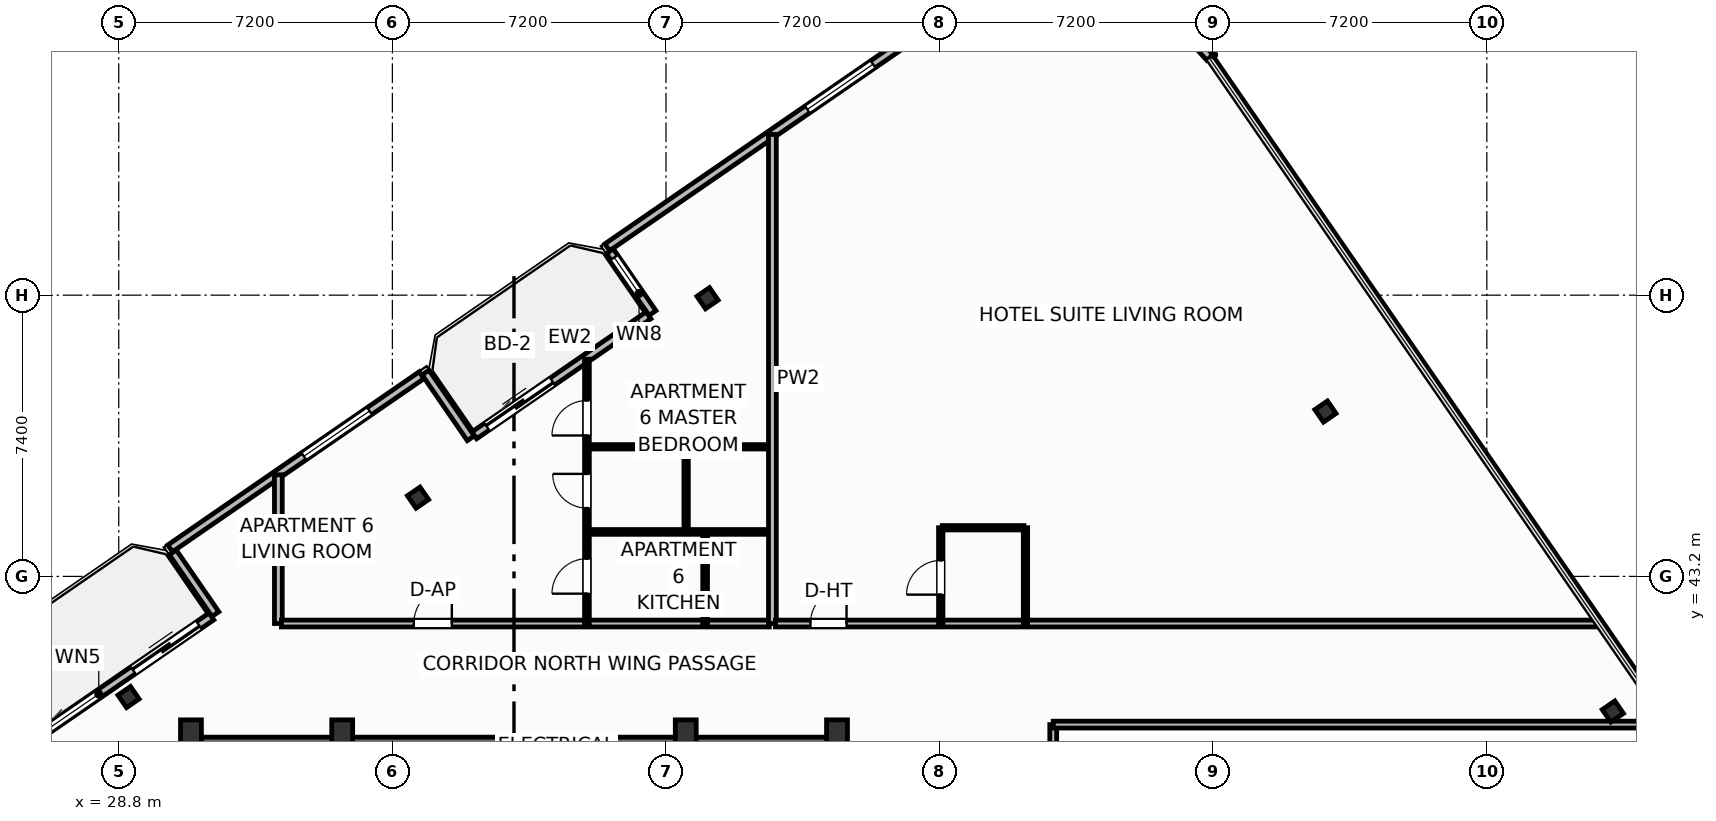
"""IFC4 building model, lengths in metres.
Left out: names, types, materials, properties, quantities, classifications, styles, units other than length and angle.
Written with IfcOpenShell. Run it as: python <this file> out.ifc"""

import sys

from ifc_helpers import new_model, si_unit, direction, frame, frame_2d, origin, origin_2d, place, context, subcontext, project, spatial, rectangle, i_section, extrude, element, fill, save


model = new_model("IFC4")
c1 = context("Model", 3, precision=1e-05, world=origin(), true_north=direction((0.0, 1.0)))
c2 = subcontext(c1, "Body", "Model", "MODEL_VIEW")
j1 = project(units=[si_unit("LENGTHUNIT", "METRE"), si_unit("PLANEANGLEUNIT", "RADIAN")], contexts=[c1])
p1 = place(None, origin())
s1 = spatial("IfcSite", under=j1, at=p1, CompositionType="ELEMENT")
p2 = place(p1, origin())
s2 = spatial("IfcBuilding", under=s1, at=p2, CompositionType="ELEMENT")
p3 = place(p2, frame((0.0, 0.0, 273.0)))
s3 = spatial("IfcBuildingStorey", under=s2, at=p3, CompositionType="ELEMENT", Elevation=273.0)
for number, where, z_axis, x_axis in (
    (1, (30.7, 39.05, 0.0), (0.0, 0.0, 1.0), (1.0, 0.0, 0.0)),
    (2, (34.68, 39.05, 0.0), (0.0, 0.0, 1.0), (1.0, 0.0, 0.0)),
    (3, (43.72, 39.05, 0.0), (0.0, 0.0, 1.0), (1.0, 0.0, 0.0)),
    (4, (47.7, 39.05, 0.0), (0.0, 0.0, 1.0), (1.0, 0.0, 0.0)),
):
    element("IfcColumn", number, at=place(p3, frame(where, z_axis=z_axis, x_axis=x_axis)), inside=s3, PredefinedType="COLUMN", context=c2, shape_type="SweptSolid", body=[
        extrude(rectangle(XDim=0.55, YDim=0.75, at=origin_2d()), origin(), (0.0, 0.0, 1.0), 3.7),
    ])
p4 = place(p3, frame((30.58, 38.695, 0.0), z_axis=(0.0, 0.0, 1.0), x_axis=(1.0, 0.0, 0.0)))
e5 = element("IfcWall", 5, at=p4, inside=s3, PredefinedType="SHEAR", context=c2, shape_type="SweptSolid", body=[
    extrude(rectangle(XDim=17.24, YDim=0.55, at=frame_2d((8.62, 0.0))), origin(), (0.0, 0.0, 1.0), 3.45),
])
for number, where, z_axis, x_axis in (
    (6, (68.115, 39.644, 0.0), (0.0, 0.0, 1.0), (0.824, 0.567, 0.0)),
    (7, (60.554, 47.537, 0.0), (0.0, 0.0, 1.0), (0.824, 0.567, 0.0)),
    (8, (44.292, 50.519, 0.0), (0.0, 0.0, 1.0), (0.824, 0.567, 0.0)),
    (9, (36.675, 45.272, 0.0), (0.0, 0.0, 1.0), (0.824, 0.567, 0.0)),
    (10, (29.057, 40.025, 0.0), (0.0, 0.0, 1.0), (0.824, 0.567, 0.0)),
):
    element("IfcColumn", number, at=place(p3, frame(where, z_axis=z_axis, x_axis=x_axis)), inside=s3, PredefinedType="COLUMN", context=c2, shape_type="SweptSolid", body=[
        extrude(i_section(OverallWidth=0.401, OverallDepth=0.399, WebThickness=0.025, FlangeThickness=0.04, FilletRadius=0.022, at=origin_2d()), origin(), (0.0, 0.0, 1.0), 3.7),
    ])
p5 = place(p3, frame((26.297, 38.743, 0.0), z_axis=(0.0, 0.0, 1.0), x_axis=(0.823534636215, 0.567265989598, 0.0)))
e11 = element("IfcWall", 11, at=p5, inside=s3, PredefinedType="SOLIDWALL", context=c2, shape_type="SweptSolid", body=[
    extrude(rectangle(XDim=6.0, YDim=0.22, at=frame_2d((3.0, 0.0))), origin(), (0.0, 0.0, 1.0), 2.73),
])
p6 = place(p5, frame((3.5, 0.0, 0.0)))
e12 = element("IfcOpeningElement", 12, at=p6, cuts=e11, PredefinedType="OPENING", context=c2, shape_type="SweptSolid", body=[
    extrude(rectangle(XDim=2.1, YDim=2.3, at=frame_2d((1.05, 1.15))), frame((0.0, 0.12, 0.0), z_axis=(0.0, -1.0, 0.0), x_axis=(1.0, 0.0, 0.0)), (0.0, 0.0, 1.0), 0.24),
])
p7 = place(p5, frame((0.55, 0.0, 0.75)))
e13 = element("IfcOpeningElement", 13, at=p7, cuts=e11, PredefinedType="OPENING", context=c2, shape_type="SweptSolid", body=[
    extrude(rectangle(XDim=1.85, YDim=1.75, at=frame_2d((0.925, 0.875))), frame((0.0, 0.12, 0.0), z_axis=(0.0, -1.0, 0.0), x_axis=(1.0, 0.0, 0.0)), (0.0, 0.0, 1.0), 0.24),
])
p8 = place(p3, frame((38.156, 46.912, 0.0), z_axis=(0.0, 0.0, 1.0), x_axis=(0.823527178548, 0.567276816195, 0.0)))
e14 = element("IfcWall", 14, at=p8, inside=s3, PredefinedType="SOLIDWALL", context=c2, shape_type="SweptSolid", body=[
    extrude(rectangle(XDim=5.567, YDim=0.22, at=frame_2d((2.783, 0.0))), origin(), (0.0, 0.0, 1.0), 2.73),
])
p9 = place(p8, frame((0.4, 0.0, 0.0)))
e15 = element("IfcOpeningElement", 15, at=p9, cuts=e14, PredefinedType="OPENING", context=c2, shape_type="SweptSolid", body=[
    extrude(rectangle(XDim=2.1, YDim=2.3, at=frame_2d((1.05, 1.15))), frame((0.0, 0.12, 0.0), z_axis=(0.0, -1.0, 0.0), x_axis=(1.0, 0.0, 0.0)), (0.0, 0.0, 1.0), 0.24),
])
p10 = place(p3, frame((57.51, 56.855, 0.0), z_axis=(0.0, 0.0, 1.0), x_axis=(-0.669853727156, 0.742493086982, 0.0)))
e16 = element("IfcWall", 16, at=p10, inside=s3, PredefinedType="SOLIDWALL", context=c2, shape_type="SweptSolid", body=[
    extrude(rectangle(XDim=1.274, YDim=0.22, at=frame_2d((0.637, 0.0))), origin(), (0.0, 0.0, 1.0), 2.73),
])
p11 = place(p3, frame((50.697, 58.087, 0.0), z_axis=(0.0, 0.0, 1.0), x_axis=(-0.823539455464, -0.567258993137, 0.0)))
e17 = element("IfcWall", 17, at=p11, inside=s3, PredefinedType="SOLIDWALL", context=c2, shape_type="SweptSolid", body=[
    extrude(rectangle(XDim=10.98, YDim=0.22, at=frame_2d((5.49, 0.0))), origin(), (0.0, 0.0, 1.0), 2.73),
])
p12 = place(p11, frame((2.486, 0.0, 0.8)))
e18 = element("IfcOpeningElement", 18, at=p12, cuts=e17, PredefinedType="OPENING", context=c2, shape_type="SweptSolid", body=[
    extrude(rectangle(XDim=2.1, YDim=1.75, at=frame_2d((1.05, 0.875))), frame((0.0, 0.12, 0.0), z_axis=(0.0, -1.0, 0.0), x_axis=(1.0, 0.0, 0.0)), (0.0, 0.0, 1.0), 0.24),
])
p13 = place(p3, frame((41.725, 51.756, 0.0), z_axis=(0.0, 0.0, 1.0), x_axis=(0.567273565974, -0.823529417415, 0.0)))
e19 = element("IfcWall", 19, at=p13, inside=s3, PredefinedType="SOLIDWALL", context=c2, shape_type="SweptSolid", body=[
    extrude(rectangle(XDim=1.975, YDim=0.22, at=frame_2d((0.988, 0.0))), origin(), (0.0, 0.0, 1.0), 2.73),
])
p14 = place(p13, frame((0.2, 0.0, 0.8)))
e20 = element("IfcOpeningElement", 20, at=p14, cuts=e19, PredefinedType="OPENING", context=c2, shape_type="SweptSolid", body=[
    extrude(rectangle(XDim=1.15, YDim=1.4, at=frame_2d((0.575, 0.7))), frame((0.0, 0.12, 0.0), z_axis=(0.0, -1.0, 0.0), x_axis=(1.0, 0.0, 0.0)), (0.0, 0.0, 1.0), 0.24),
])
p15 = place(p3, frame((38.063, 46.835, 0.0), z_axis=(0.0, 0.0, 1.0), x_axis=(-0.567219383419, 0.823566737474, 0.0)))
e21 = element("IfcWall", 21, at=p15, inside=s3, PredefinedType="SOLIDWALL", context=c2, shape_type="SweptSolid", body=[
    extrude(rectangle(XDim=2.1, YDim=0.22, at=frame_2d((1.05, 0.0))), origin(), (0.0, 0.0, 1.0), 2.73),
])
p16 = place(p3, frame((36.769, 48.494, 0.0), z_axis=(0.0, 0.0, 1.0), x_axis=(-0.823521165086, -0.56728554596, 0.0)))
e22 = element("IfcWall", 22, at=p16, inside=s3, PredefinedType="SOLIDWALL", context=c2, shape_type="SweptSolid", body=[
    extrude(rectangle(XDim=8.035, YDim=0.22, at=frame_2d((4.018, 0.0))), origin(), (0.0, 0.0, 1.0), 2.73),
])
p17 = place(p16, frame((1.662, 0.0, 0.8)))
e23 = element("IfcOpeningElement", 23, at=p17, cuts=e22, PredefinedType="OPENING", context=c2, shape_type="SweptSolid", body=[
    extrude(rectangle(XDim=2.1, YDim=1.75, at=frame_2d((1.05, 0.875))), frame((0.0, 0.12, 0.0), z_axis=(0.0, -1.0, 0.0), x_axis=(1.0, 0.0, 0.0)), (0.0, 0.0, 1.0), 0.24),
])
p18 = place(p3, frame((30.223, 43.833, 0.0), z_axis=(0.0, 0.0, 1.0), x_axis=(0.567215821234, -0.823569190865, 0.0)))
e24 = element("IfcWall", 24, at=p18, inside=s3, PredefinedType="SOLIDWALL", context=c2, shape_type="SweptSolid", body=[
    extrude(rectangle(XDim=1.975, YDim=0.22, at=frame_2d((0.988, 0.0))), origin(), (0.0, 0.0, 1.0), 2.73),
])
p19 = place(p3, frame((33.0, 41.96, 0.0), z_axis=(0.0, 0.0, 1.0), x_axis=(0.0, 1.0, 0.0)))
e25 = element("IfcWall", 25, at=p19, inside=s3, PredefinedType="PARTITIONING", context=c2, shape_type="SweptSolid", body=[
    extrude(rectangle(XDim=3.914, YDim=0.205, at=frame_2d((1.957, 0.0))), origin(), (0.0, 0.0, 1.0), 3.45),
])
p20 = place(p3, frame((33.08, 41.96, 0.0), z_axis=(0.0, 0.0, 1.0), x_axis=(1.0, 0.0, 0.0)))
e26 = element("IfcWall", 26, at=p20, inside=s3, PredefinedType="PARTITIONING", context=c2, shape_type="SweptSolid", body=[
    extrude(rectangle(XDim=12.84, YDim=0.18, at=frame_2d((6.42, 0.0))), origin(), (0.0, 0.0, 1.0), 3.45),
])
p21 = place(p20, frame((3.485, 0.0, 0.0)))
e27 = element("IfcOpeningElement", 27, at=p21, cuts=e26, PredefinedType="OPENING", context=c2, shape_type="SweptSolid", body=[
    extrude(rectangle(XDim=1.0, YDim=2.2, at=frame_2d((0.5, 1.1))), frame((0.0, 0.1, 0.0), z_axis=(0.0, -1.0, 0.0), x_axis=(1.0, 0.0, 0.0)), (0.0, 0.0, 1.0), 0.2),
])
p22 = place(p3, frame((41.12, 41.96, 0.0), z_axis=(0.0, 0.0, 1.0), x_axis=(0.0, 1.0, 0.0)))
e28 = element("IfcWall", 28, at=p22, inside=s3, PredefinedType="PARTITIONING", context=c2, shape_type="SweptSolid", body=[
    extrude(rectangle(XDim=6.957, YDim=0.125, at=frame_2d((3.479, 0.0))), origin(), (0.0, 0.0, 1.0), 3.45),
])
p23 = place(p22, frame((0.785, 0.0, 0.0)))
e29 = element("IfcOpeningElement", 29, at=p23, cuts=e28, PredefinedType="OPENING", context=c2, shape_type="SweptSolid", body=[
    extrude(rectangle(XDim=0.92, YDim=2.05, at=frame_2d((0.46, 1.025))), frame((0.0, 0.073, 0.0), z_axis=(0.0, -1.0, 0.0), x_axis=(1.0, 0.0, 0.0)), (0.0, 0.0, 1.0), 0.145),
])
p24 = place(p22, frame((3.037, 0.0, 0.0)))
e30 = element("IfcOpeningElement", 30, at=p24, cuts=e28, PredefinedType="OPENING", context=c2, shape_type="SweptSolid", body=[
    extrude(rectangle(XDim=0.9, YDim=2.05, at=frame_2d((0.45, 1.025))), frame((0.0, 0.073, 0.0), z_axis=(0.0, -1.0, 0.0), x_axis=(1.0, 0.0, 0.0)), (0.0, 0.0, 1.0), 0.145),
])
p25 = place(p22, frame((4.948, 0.0, 0.0)))
e31 = element("IfcOpeningElement", 31, at=p25, cuts=e28, PredefinedType="OPENING", context=c2, shape_type="SweptSolid", body=[
    extrude(rectangle(XDim=0.92, YDim=2.05, at=frame_2d((0.46, 1.025))), frame((0.0, 0.073, 0.0), z_axis=(0.0, -1.0, 0.0), x_axis=(1.0, 0.0, 0.0)), (0.0, 0.0, 1.0), 0.145),
])
p26 = place(p3, frame((41.19, 44.37, 0.0), z_axis=(0.0, 0.0, 1.0), x_axis=(1.0, 0.0, 0.0)))
e32 = element("IfcWall", 32, at=p26, inside=s3, PredefinedType="PARTITIONING", context=c2, shape_type="SweptSolid", body=[
    extrude(rectangle(XDim=4.73, YDim=0.125, at=frame_2d((2.365, 0.0))), origin(), (0.0, 0.0, 1.0), 3.45),
])
p27 = place(p3, frame((41.19, 46.61, 0.0), z_axis=(0.0, 0.0, 1.0), x_axis=(1.0, 0.0, 0.0)))
e33 = element("IfcWall", 33, at=p27, inside=s3, PredefinedType="PARTITIONING", context=c2, shape_type="SweptSolid", body=[
    extrude(rectangle(XDim=4.73, YDim=0.115, at=frame_2d((2.365, 0.0))), origin(), (0.0, 0.0, 1.0), 3.45),
])
p28 = place(p3, frame((44.23, 41.96, 0.0), z_axis=(0.0, 0.0, 1.0), x_axis=(0.0, 1.0, 0.0)))
e34 = element("IfcWall", 34, at=p28, inside=s3, PredefinedType="PARTITIONING", context=c2, shape_type="SweptSolid", body=[
    extrude(rectangle(XDim=2.41, YDim=0.125, at=frame_2d((1.205, 0.0))), origin(), (0.0, 0.0, 1.0), 3.45),
])
p29 = place(p3, frame((43.73, 44.37, 0.0), z_axis=(0.0, 0.0, 1.0), x_axis=(0.0, 1.0, 0.0)))
e35 = element("IfcWall", 35, at=p29, inside=s3, PredefinedType="PARTITIONING", context=c2, shape_type="SweptSolid", body=[
    extrude(rectangle(XDim=2.24, YDim=0.115, at=frame_2d((1.12, 0.0))), origin(), (0.0, 0.0, 1.0), 3.45),
])
p30 = place(p3, frame((46.0, 41.96, 0.0), z_axis=(0.0, 0.0, 1.0), x_axis=(0.0, 1.0, 0.0)))
e36 = element("IfcWall", 36, at=p30, inside=s3, PredefinedType="PARTITIONING", context=c2, shape_type="SweptSolid", body=[
    extrude(rectangle(XDim=12.868, YDim=0.205, at=frame_2d((6.434, 0.0))), origin(), (0.0, 0.0, 1.0), 3.45),
])
p31 = place(p3, frame((46.08, 41.96, 0.0), z_axis=(0.0, 0.0, 1.0), x_axis=(1.0, 0.0, 0.0)))
e37 = element("IfcWall", 37, at=p31, inside=s3, PredefinedType="PARTITIONING", context=c2, shape_type="SweptSolid", body=[
    extrude(rectangle(XDim=21.627, YDim=0.18, at=frame_2d((10.813, 0.0))), origin(), (0.0, 0.0, 1.0), 3.45),
])
p32 = place(p31, frame((0.921, 0.0, 0.0)))
e38 = element("IfcOpeningElement", 38, at=p32, cuts=e37, PredefinedType="OPENING", context=c2, shape_type="SweptSolid", body=[
    extrude(rectangle(XDim=0.95, YDim=2.15, at=frame_2d((0.475, 1.075))), frame((0.0, 0.1, 0.0), z_axis=(0.0, -1.0, 0.0), x_axis=(1.0, 0.0, 0.0)), (0.0, 0.0, 1.0), 0.2),
])
p33 = place(p3, frame((50.47, 44.48, 0.0), z_axis=(0.0, 0.0, 1.0), x_axis=(1.0, 0.0, 0.0)))
e39 = element("IfcWall", 39, at=p33, inside=s3, PredefinedType="PARTITIONING", context=c2, shape_type="SweptSolid", body=[
    extrude(rectangle(XDim=2.15, YDim=0.115, at=frame_2d((1.075, 0.0))), origin(), (0.0, 0.0, 1.0), 3.018),
])
p34 = place(p3, frame((50.43, 41.96, 0.0), z_axis=(0.0, 0.0, 1.0), x_axis=(0.0, 1.0, 0.0)))
e40 = element("IfcWall", 40, at=p34, inside=s3, PredefinedType="PARTITIONING", context=c2, shape_type="SweptSolid", body=[
    extrude(rectangle(XDim=2.52, YDim=0.115, at=frame_2d((1.26, 0.0))), origin(), (0.0, 0.0, 1.0), 3.45),
])
p35 = place(p34, frame((0.76, 0.0, 0.0)))
e41 = element("IfcOpeningElement", 41, at=p35, cuts=e40, PredefinedType="OPENING", context=c2, shape_type="SweptSolid", body=[
    extrude(rectangle(XDim=0.9, YDim=2.05, at=frame_2d((0.45, 1.025))), frame((0.0, 0.067, 0.0), z_axis=(0.0, -1.0, 0.0), x_axis=(1.0, 0.0, 0.0)), (0.0, 0.0, 1.0), 0.135),
])
p36 = place(p3, frame((52.66, 41.96, 0.0), z_axis=(0.0, 0.0, 1.0), x_axis=(0.0, 1.0, 0.0)))
e42 = element("IfcWall", 42, at=p36, inside=s3, PredefinedType="PARTITIONING", context=c2, shape_type="SweptSolid", body=[
    extrude(rectangle(XDim=2.52, YDim=0.115, at=frame_2d((1.26, 0.0))), origin(), (0.0, 0.0, 1.0), 3.45),
])
p37 = place(p3, frame((53.39, 26.84, 0.0), z_axis=(0.0, 0.0, 1.0), x_axis=(0.0, 1.0, 0.0)))
e43 = element("IfcWall", 43, at=p37, inside=s3, PredefinedType="PARTITIONING", context=c2, shape_type="SweptSolid", body=[
    extrude(rectangle(XDim=12.46, YDim=0.18, at=frame_2d((6.23, 0.0))), origin(), (0.0, 0.0, 1.0), 3.45),
])
p38 = place(p37, frame((0.618, 0.0, 0.0)))
e44 = element("IfcOpeningElement", 44, at=p38, cuts=e43, PredefinedType="OPENING", context=c2, shape_type="SweptSolid", body=[
    extrude(rectangle(XDim=0.92, YDim=2.05, at=frame_2d((0.46, 1.025))), frame((0.0, 0.1, 0.0), z_axis=(0.0, -1.0, 0.0), x_axis=(1.0, 0.0, 0.0)), (0.0, 0.0, 1.0), 0.2),
])
p39 = place(p3, frame((53.39, 39.3, 0.0), z_axis=(0.0, 0.0, 1.0), x_axis=(1.0, 0.0, 0.0)))
e45 = element("IfcWall", 45, at=p39, inside=s3, PredefinedType="PARTITIONING", context=c2, shape_type="SweptSolid", body=[
    extrude(rectangle(XDim=16.149, YDim=0.18, at=frame_2d((8.075, 0.0))), origin(), (0.0, 0.0, 1.0), 2.739),
])
p40 = place(p6, origin())
e46 = element("IfcDoor", 46, at=p40, inside=s3, OperationType="SLIDING_TO_LEFT", PredefinedType="DOOR", context=c2, shape_type="SweptSolid", body=[
    extrude(rectangle(XDim=2.1, YDim=2.3, at=frame_2d((1.05, 1.15))), frame((0.0, 0.025, 0.0), z_axis=(0.0, -1.0, 0.0), x_axis=(1.0, 0.0, 0.0)), (0.0, 0.0, 1.0), 0.05),
])
fill(e12, e46)
p41 = place(p7, origin())
e47 = element("IfcWindow", 47, at=p41, inside=s3, PartitioningType="SINGLE_PANEL", PredefinedType="WINDOW", context=c2, shape_type="SweptSolid", body=[
    extrude(rectangle(XDim=1.85, YDim=1.75, at=frame_2d((0.925, 0.875))), frame((0.0, 0.03, 0.0), z_axis=(0.0, -1.0, 0.0), x_axis=(1.0, 0.0, 0.0)), (0.0, 0.0, 1.0), 0.06),
])
fill(e13, e47)
p42 = place(p9, origin())
e48 = element("IfcDoor", 48, at=p42, inside=s3, OperationType="SLIDING_TO_LEFT", PredefinedType="DOOR", context=c2, shape_type="SweptSolid", body=[
    extrude(rectangle(XDim=2.1, YDim=2.3, at=frame_2d((1.05, 1.15))), frame((0.0, 0.025, 0.0), z_axis=(0.0, -1.0, 0.0), x_axis=(1.0, 0.0, 0.0)), (0.0, 0.0, 1.0), 0.05),
])
fill(e15, e48)
p43 = place(p12, origin())
e49 = element("IfcWindow", 49, at=p43, inside=s3, PartitioningType="SINGLE_PANEL", PredefinedType="WINDOW", context=c2, shape_type="SweptSolid", body=[
    extrude(rectangle(XDim=2.1, YDim=1.75, at=frame_2d((1.05, 0.875))), frame((0.0, 0.03, 0.0), z_axis=(0.0, -1.0, 0.0), x_axis=(1.0, 0.0, 0.0)), (0.0, 0.0, 1.0), 0.06),
])
fill(e18, e49)
p44 = place(p17, origin())
e50 = element("IfcWindow", 50, at=p44, inside=s3, PartitioningType="SINGLE_PANEL", PredefinedType="WINDOW", context=c2, shape_type="SweptSolid", body=[
    extrude(rectangle(XDim=2.1, YDim=1.75, at=frame_2d((1.05, 0.875))), frame((0.0, 0.03, 0.0), z_axis=(0.0, -1.0, 0.0), x_axis=(1.0, 0.0, 0.0)), (0.0, 0.0, 1.0), 0.06),
])
fill(e23, e50)
p45 = place(p21, origin())
e51 = element("IfcDoor", 51, at=p45, inside=s3, OperationType="SINGLE_SWING_RIGHT", PredefinedType="DOOR", context=c2, shape_type="SweptSolid", body=[
    extrude(rectangle(XDim=1.0, YDim=2.2, at=frame_2d((0.5, 1.1))), frame((0.0, 0.025, 0.0), z_axis=(0.0, -1.0, 0.0), x_axis=(1.0, 0.0, 0.0)), (0.0, 0.0, 1.0), 0.05),
])
fill(e27, e51)
p46 = place(p23, origin())
e52 = element("IfcDoor", 52, at=p46, inside=s3, OperationType="SINGLE_SWING_LEFT", PredefinedType="DOOR", context=c2, shape_type="SweptSolid", body=[
    extrude(rectangle(XDim=0.92, YDim=2.05, at=frame_2d((0.46, 1.025))), frame((0.0, 0.025, 0.0), z_axis=(0.0, -1.0, 0.0), x_axis=(1.0, 0.0, 0.0)), (0.0, 0.0, 1.0), 0.05),
])
fill(e29, e52)
p47 = place(p24, origin())
e53 = element("IfcDoor", 53, at=p47, inside=s3, OperationType="SINGLE_SWING_RIGHT", PredefinedType="DOOR", context=c2, shape_type="SweptSolid", body=[
    extrude(rectangle(XDim=0.9, YDim=2.05, at=frame_2d((0.45, 1.025))), frame((0.0, 0.025, 0.0), z_axis=(0.0, -1.0, 0.0), x_axis=(1.0, 0.0, 0.0)), (0.0, 0.0, 1.0), 0.05),
])
fill(e30, e53)
p48 = place(p25, origin())
e54 = element("IfcDoor", 54, at=p48, inside=s3, OperationType="SINGLE_SWING_LEFT", PredefinedType="DOOR", context=c2, shape_type="SweptSolid", body=[
    extrude(rectangle(XDim=0.92, YDim=2.05, at=frame_2d((0.46, 1.025))), frame((0.0, 0.025, 0.0), z_axis=(0.0, -1.0, 0.0), x_axis=(1.0, 0.0, 0.0)), (0.0, 0.0, 1.0), 0.05),
])
fill(e31, e54)
p49 = place(p32, origin())
e55 = element("IfcDoor", 55, at=p49, inside=s3, OperationType="SINGLE_SWING_RIGHT", PredefinedType="DOOR", context=c2, shape_type="SweptSolid", body=[
    extrude(rectangle(XDim=0.95, YDim=2.15, at=frame_2d((0.475, 1.075))), frame((0.0, 0.025, 0.0), z_axis=(0.0, -1.0, 0.0), x_axis=(1.0, 0.0, 0.0)), (0.0, 0.0, 1.0), 0.05),
])
fill(e38, e55)
p50 = place(p35, origin())
e56 = element("IfcDoor", 56, at=p50, inside=s3, OperationType="SINGLE_SWING_LEFT", PredefinedType="DOOR", context=c2, shape_type="SweptSolid", body=[
    extrude(rectangle(XDim=0.9, YDim=2.05, at=frame_2d((0.45, 1.025))), frame((0.0, 0.025, 0.0), z_axis=(0.0, -1.0, 0.0), x_axis=(1.0, 0.0, 0.0)), (0.0, 0.0, 1.0), 0.05),
])
fill(e41, e56)
p51 = place(p14, origin())
e57 = element("IfcWindow", 57, at=p51, inside=s3, PartitioningType="SINGLE_PANEL", PredefinedType="WINDOW", context=c2, shape_type="SweptSolid", body=[
    extrude(rectangle(XDim=1.15, YDim=1.4, at=frame_2d((0.575, 0.7))), frame((0.0, 0.03, 0.0), z_axis=(0.0, -1.0, 0.0), x_axis=(1.0, 0.0, 0.0)), (0.0, 0.0, 1.0), 0.06),
])
fill(e20, e57)
save(model, sys.argv[1])
